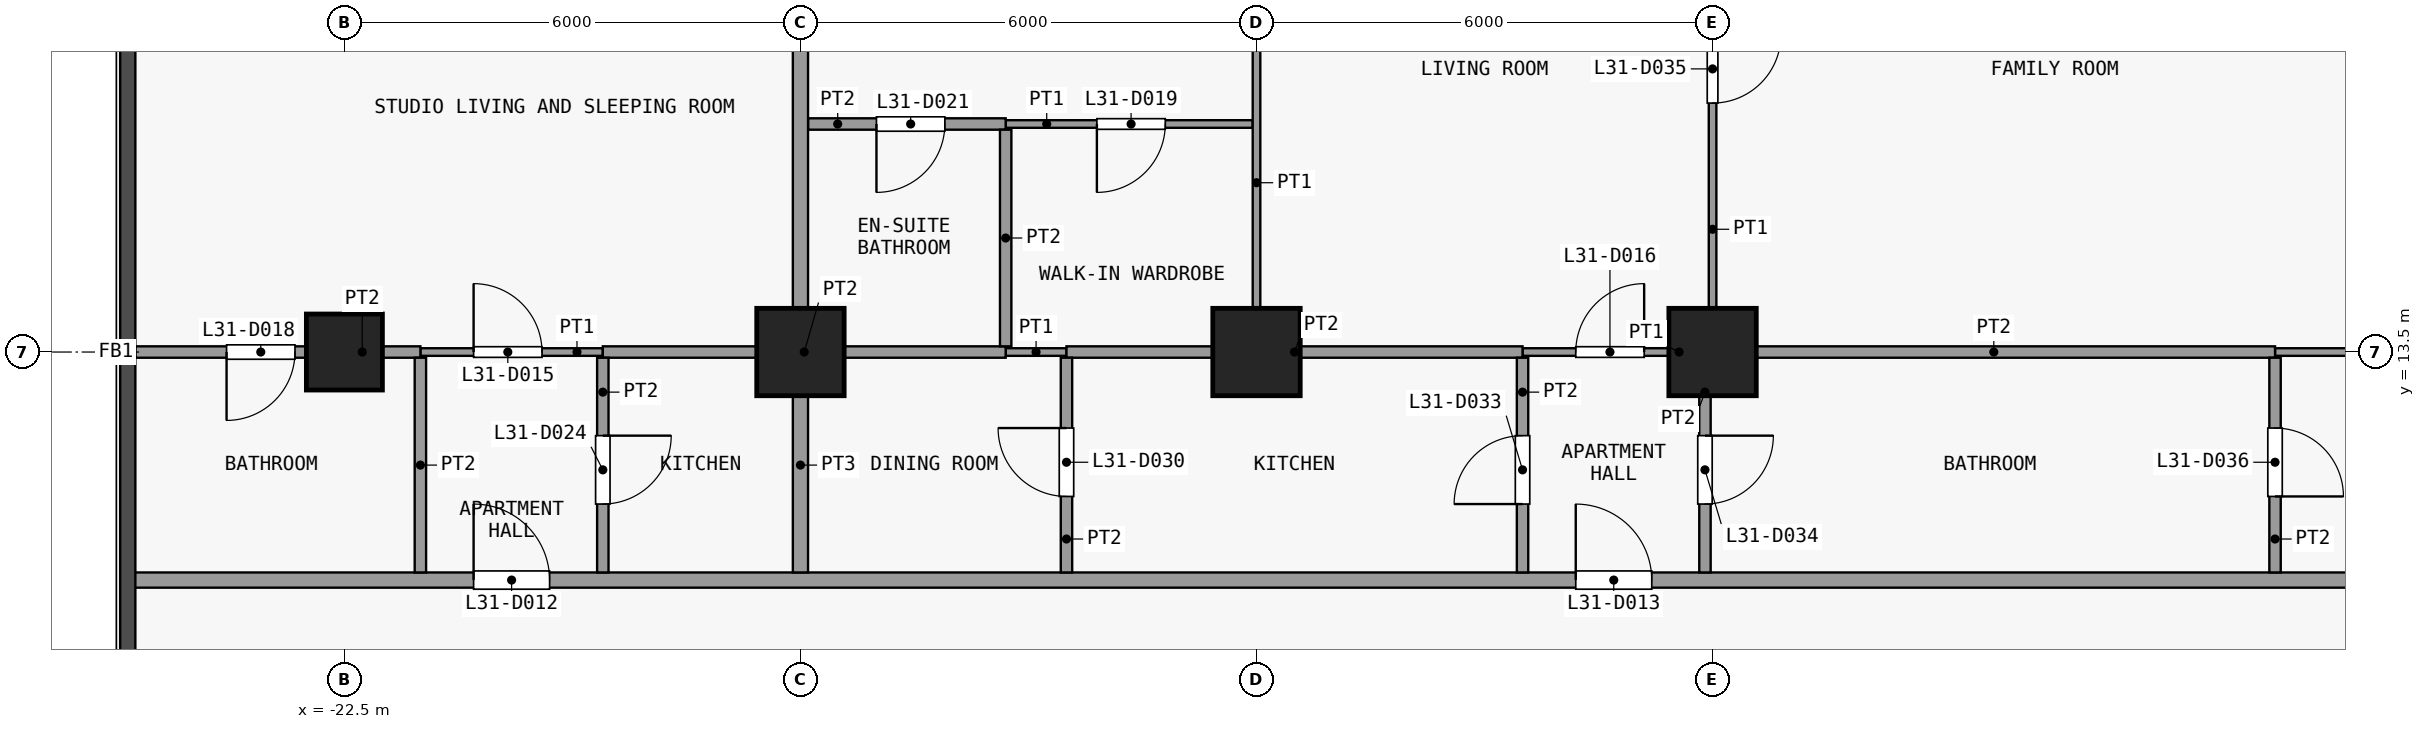
"""IFC4 building model, lengths in metres.
Left out: names, types, materials, properties, quantities, classifications, styles, units other than length and angle.
Written with IfcOpenShell. Run it as: python <this file> out.ifc"""

import sys

from ifc_helpers import new_model, si_unit, direction, frame, frame_2d, origin, origin_2d, place, context, subcontext, project, spatial, rectangle, extrude, element, fill, save


model = new_model("IFC4")
c1 = context("Model", 3, precision=1e-05, world=origin(), true_north=direction((0.0, 1.0)))
c2 = subcontext(c1, "Body", "Model", "MODEL_VIEW")
j1 = project(units=[si_unit("LENGTHUNIT", "METRE"), si_unit("PLANEANGLEUNIT", "RADIAN")], contexts=[c1])
p1 = place(None, origin())
s1 = spatial("IfcSite", under=j1, at=p1, CompositionType="ELEMENT")
p2 = place(p1, origin())
s2 = spatial("IfcBuilding", under=s1, at=p2, CompositionType="ELEMENT")
p3 = place(p2, frame((0.0, 0.0, 124.3)))
s3 = spatial("IfcBuildingStorey", under=s2, at=p3, CompositionType="ELEMENT", Elevation=124.3)
p4 = place(p3, frame((-22.5, 13.5, 0.0), z_axis=(0.0, 0.0, 1.0), x_axis=(1.0, 0.0, 0.0)))
e1 = element("IfcColumn", 1, at=p4, inside=s3, PredefinedType="COLUMN", context=c2, shape_type="SweptSolid", body=[
    extrude(rectangle(XDim=1.0, YDim=1.0, at=origin_2d()), origin(), (0.0, 0.0, 1.0), 3.6),
])
for number, where, z_axis, x_axis in (
    (2, (-16.5, 13.5, 0.0), (0.0, 0.0, 1.0), (1.0, 0.0, 0.0)),
    (3, (-10.5, 13.5, 0.0), (0.0, 0.0, 1.0), (1.0, 0.0, 0.0)),
    (4, (-4.5, 13.5, 0.0), (0.0, 0.0, 1.0), (1.0, 0.0, 0.0)),
):
    element("IfcColumn", number, at=place(p3, frame(where, z_axis=z_axis, x_axis=x_axis)), inside=s3, PredefinedType="COLUMN", context=c2, shape_type="SweptSolid", body=[
        extrude(rectangle(XDim=1.15, YDim=1.15, at=origin_2d()), origin(), (0.0, 0.0, 1.0), 3.6),
    ])
p5 = place(p3, frame((-25.35, 10.5, 0.0), z_axis=(0.0, 0.0, 1.0), x_axis=(1.0, 0.0, 0.0)))
e5 = element("IfcWall", 5, at=p5, inside=s3, PredefinedType="PARTITIONING", context=c2, shape_type="SweptSolid", body=[
    extrude(rectangle(XDim=49.2, YDim=0.2, at=frame_2d((24.6, 0.0))), origin(), (0.0, 0.0, 1.0), 3.3),
])
p6 = place(p5, frame((4.55, 0.0, 0.0)))
e6 = element("IfcOpeningElement", 6, at=p6, cuts=e5, PredefinedType="OPENING", context=c2, shape_type="SweptSolid", body=[
    extrude(rectangle(XDim=1.0, YDim=2.1, at=frame_2d((0.5, 1.05))), frame((0.0, 0.11, 0.0), z_axis=(0.0, -1.0, 0.0), x_axis=(1.0, 0.0, 0.0)), (0.0, 0.0, 1.0), 0.22),
])
p7 = place(p5, frame((19.05, 0.0, 0.0)))
e7 = element("IfcOpeningElement", 7, at=p7, cuts=e5, PredefinedType="OPENING", context=c2, shape_type="SweptSolid", body=[
    extrude(rectangle(XDim=1.0, YDim=2.1, at=frame_2d((0.5, 1.05))), frame((0.0, 0.11, 0.0), z_axis=(0.0, -1.0, 0.0), x_axis=(1.0, 0.0, 0.0)), (0.0, 0.0, 1.0), 0.22),
])
p8 = place(p5, frame((39.05, 0.0, 0.0)))
e8 = element("IfcOpeningElement", 8, at=p8, cuts=e5, PredefinedType="OPENING", context=c2, shape_type="SweptSolid", body=[
    extrude(rectangle(XDim=1.0, YDim=2.1, at=frame_2d((0.5, 1.05))), frame((0.0, 0.11, 0.0), z_axis=(0.0, -1.0, 0.0), x_axis=(1.0, 0.0, 0.0)), (0.0, 0.0, 1.0), 0.22),
])
p9 = place(p3, frame((-21.5, 13.5, 0.0), z_axis=(0.0, 0.0, 1.0), x_axis=(1.0, 0.0, 0.0)))
e9 = element("IfcWall", 9, at=p9, inside=s3, PredefinedType="PARTITIONING", context=c2, shape_type="SweptSolid", body=[
    extrude(rectangle(XDim=2.4, YDim=0.1, at=frame_2d((1.2, 0.0))), origin(), (0.0, 0.0, 1.0), 3.3),
])
p10 = place(p9, frame((0.7, 0.0, 0.0)))
e10 = element("IfcOpeningElement", 10, at=p10, cuts=e9, PredefinedType="OPENING", context=c2, shape_type="SweptSolid", body=[
    extrude(rectangle(XDim=0.9, YDim=2.1, at=frame_2d((0.45, 1.05))), frame((0.0, 0.06, 0.0), z_axis=(0.0, -1.0, 0.0), x_axis=(1.0, 0.0, 0.0)), (0.0, 0.0, 1.0), 0.12),
])
p11 = place(p3, frame((-13.8, 13.5, 0.0), z_axis=(0.0, 0.0, 1.0), x_axis=(1.0, 0.0, 0.0)))
e11 = element("IfcWall", 11, at=p11, inside=s3, PredefinedType="PARTITIONING", context=c2, shape_type="SweptSolid", body=[
    extrude(rectangle(XDim=0.8, YDim=0.1, at=frame_2d((0.4, 0.0))), origin(), (0.0, 0.0, 1.0), 3.3),
])
p12 = place(p3, frame((-7.0, 13.5, 0.0), z_axis=(0.0, 0.0, 1.0), x_axis=(1.0, 0.0, 0.0)))
e12 = element("IfcWall", 12, at=p12, inside=s3, PredefinedType="PARTITIONING", context=c2, shape_type="SweptSolid", body=[
    extrude(rectangle(XDim=2.4, YDim=0.1, at=frame_2d((1.2, 0.0))), origin(), (0.0, 0.0, 1.0), 3.3),
])
p13 = place(p12, frame((0.7, 0.0, 0.0)))
e13 = element("IfcOpeningElement", 13, at=p13, cuts=e12, PredefinedType="OPENING", context=c2, shape_type="SweptSolid", body=[
    extrude(rectangle(XDim=0.9, YDim=2.1, at=frame_2d((0.45, 1.05))), frame((0.0, 0.06, 0.0), z_axis=(0.0, -1.0, 0.0), x_axis=(1.0, 0.0, 0.0)), (0.0, 0.0, 1.0), 0.12),
])
p14 = place(p3, frame((2.9, 13.5, 0.0), z_axis=(0.0, 0.0, 1.0), x_axis=(1.0, 0.0, 0.0)))
e14 = element("IfcWall", 14, at=p14, inside=s3, PredefinedType="PARTITIONING", context=c2, shape_type="SweptSolid", body=[
    extrude(rectangle(XDim=7.6, YDim=0.1, at=frame_2d((3.8, 0.0))), origin(), (0.0, 0.0, 1.0), 3.3),
])
p15 = place(p3, frame((-25.25, 13.5, 0.0), z_axis=(0.0, 0.0, 1.0), x_axis=(1.0, 0.0, 0.0)))
e15 = element("IfcWall", 15, at=p15, inside=s3, PredefinedType="PARTITIONING", context=c2, shape_type="SweptSolid", body=[
    extrude(rectangle(XDim=3.75, YDim=0.15, at=frame_2d((1.875, 0.0))), origin(), (0.0, 0.0, 1.0), 3.3),
])
p16 = place(p15, frame((1.2, 0.0, 0.0)))
e16 = element("IfcOpeningElement", 16, at=p16, cuts=e15, PredefinedType="OPENING", context=c2, shape_type="SweptSolid", body=[
    extrude(rectangle(XDim=0.9, YDim=2.1, at=frame_2d((0.45, 1.05))), frame((0.0, 0.085, 0.0), z_axis=(0.0, -1.0, 0.0), x_axis=(1.0, 0.0, 0.0)), (0.0, 0.0, 1.0), 0.17),
])
p17 = place(p3, frame((-19.1, 13.5, 0.0), z_axis=(0.0, 0.0, 1.0), x_axis=(1.0, 0.0, 0.0)))
e17 = element("IfcWall", 17, at=p17, inside=s3, PredefinedType="PARTITIONING", context=c2, shape_type="SweptSolid", body=[
    extrude(rectangle(XDim=5.3, YDim=0.15, at=frame_2d((2.65, 0.0))), origin(), (0.0, 0.0, 1.0), 3.3),
])
p18 = place(p3, frame((-13.0, 13.5, 0.0), z_axis=(0.0, 0.0, 1.0), x_axis=(1.0, 0.0, 0.0)))
e18 = element("IfcWall", 18, at=p18, inside=s3, PredefinedType="PARTITIONING", context=c2, shape_type="SweptSolid", body=[
    extrude(rectangle(XDim=6.0, YDim=0.15, at=frame_2d((3.0, 0.0))), origin(), (0.0, 0.0, 1.0), 3.3),
])
p19 = place(p3, frame((-4.5, 13.5, 0.0), z_axis=(0.0, 0.0, 1.0), x_axis=(1.0, 0.0, 0.0)))
e19 = element("IfcWall", 19, at=p19, inside=s3, PredefinedType="PARTITIONING", context=c2, shape_type="SweptSolid", body=[
    extrude(rectangle(XDim=7.4, YDim=0.15, at=frame_2d((3.7, 0.0))), origin(), (0.0, 0.0, 1.0), 3.3),
])
p20 = place(p3, frame((-13.8, 16.5, 0.0), z_axis=(0.0, 0.0, 1.0), x_axis=(1.0, 0.0, 0.0)))
e20 = element("IfcWall", 20, at=p20, inside=s3, PredefinedType="PARTITIONING", context=c2, shape_type="SweptSolid", body=[
    extrude(rectangle(XDim=3.25, YDim=0.1, at=frame_2d((1.625, 0.0))), origin(), (0.0, 0.0, 1.0), 3.3),
])
p21 = place(p20, frame((1.2, 0.0, 0.0)))
e21 = element("IfcOpeningElement", 21, at=p21, cuts=e20, PredefinedType="OPENING", context=c2, shape_type="SweptSolid", body=[
    extrude(rectangle(XDim=0.9, YDim=2.1, at=frame_2d((0.45, 1.05))), frame((0.0, 0.06, 0.0), z_axis=(0.0, -1.0, 0.0), x_axis=(1.0, 0.0, 0.0)), (0.0, 0.0, 1.0), 0.12),
])
p22 = place(p3, frame((-16.4, 16.5, 0.0), z_axis=(0.0, 0.0, 1.0), x_axis=(1.0, 0.0, 0.0)))
e22 = element("IfcWall", 22, at=p22, inside=s3, PredefinedType="PARTITIONING", context=c2, shape_type="SweptSolid", body=[
    extrude(rectangle(XDim=2.6, YDim=0.15, at=frame_2d((1.3, 0.0))), origin(), (0.0, 0.0, 1.0), 3.3),
])
p23 = place(p22, frame((0.9, 0.0, 0.0)))
e23 = element("IfcOpeningElement", 23, at=p23, cuts=e22, PredefinedType="OPENING", context=c2, shape_type="SweptSolid", body=[
    extrude(rectangle(XDim=0.9, YDim=2.1, at=frame_2d((0.45, 1.05))), frame((0.0, 0.085, 0.0), z_axis=(0.0, -1.0, 0.0), x_axis=(1.0, 0.0, 0.0)), (0.0, 0.0, 1.0), 0.17),
])
p24 = place(p3, frame((-21.5, 10.6, 0.0), z_axis=(0.0, 0.0, 1.0), x_axis=(0.0, 1.0, 0.0)))
e24 = element("IfcWall", 24, at=p24, inside=s3, PredefinedType="PARTITIONING", context=c2, shape_type="SweptSolid", body=[
    extrude(rectangle(XDim=2.825, YDim=0.15, at=frame_2d((1.413, 0.0))), origin(), (0.0, 0.0, 1.0), 3.3),
])
p25 = place(p3, frame((-19.1, 10.6, 0.0), z_axis=(0.0, 0.0, 1.0), x_axis=(0.0, 1.0, 0.0)))
e25 = element("IfcWall", 25, at=p25, inside=s3, PredefinedType="PARTITIONING", context=c2, shape_type="SweptSolid", body=[
    extrude(rectangle(XDim=2.825, YDim=0.15, at=frame_2d((1.413, 0.0))), origin(), (0.0, 0.0, 1.0), 3.3),
])
p26 = place(p25, frame((0.9, 0.0, 0.0)))
e26 = element("IfcOpeningElement", 26, at=p26, cuts=e25, PredefinedType="OPENING", context=c2, shape_type="SweptSolid", body=[
    extrude(rectangle(XDim=0.9, YDim=2.1, at=frame_2d((0.45, 1.05))), frame((0.0, 0.085, 0.0), z_axis=(0.0, -1.0, 0.0), x_axis=(1.0, 0.0, 0.0)), (0.0, 0.0, 1.0), 0.17),
])
p27 = place(p3, frame((-16.5, 10.6, 0.0), z_axis=(0.0, 0.0, 1.0), x_axis=(0.0, 1.0, 0.0)))
e27 = element("IfcWall", 27, at=p27, inside=s3, PredefinedType="PARTITIONING", context=c2, shape_type="SweptSolid", body=[
    extrude(rectangle(XDim=2.825, YDim=0.2, at=frame_2d((1.413, 0.0))), origin(), (0.0, 0.0, 1.0), 3.3),
])
p28 = place(p3, frame((-16.5, 13.575, 0.0), z_axis=(0.0, 0.0, 1.0), x_axis=(0.0, 1.0, 0.0)))
e28 = element("IfcWall", 28, at=p28, inside=s3, PredefinedType="PARTITIONING", context=c2, shape_type="SweptSolid", body=[
    extrude(rectangle(XDim=8.675, YDim=0.2, at=frame_2d((4.337, 0.0))), origin(), (0.0, 0.0, 1.0), 3.3),
])
p29 = place(p3, frame((-13.8, 13.575, 0.0), z_axis=(0.0, 0.0, 1.0), x_axis=(0.0, 1.0, 0.0)))
e29 = element("IfcWall", 29, at=p29, inside=s3, PredefinedType="PARTITIONING", context=c2, shape_type="SweptSolid", body=[
    extrude(rectangle(XDim=2.85, YDim=0.15, at=frame_2d((1.425, 0.0))), origin(), (0.0, 0.0, 1.0), 3.3),
])
p30 = place(p3, frame((-13.0, 10.6, 0.0), z_axis=(0.0, 0.0, 1.0), x_axis=(0.0, 1.0, 0.0)))
e30 = element("IfcWall", 30, at=p30, inside=s3, PredefinedType="PARTITIONING", context=c2, shape_type="SweptSolid", body=[
    extrude(rectangle(XDim=2.825, YDim=0.15, at=frame_2d((1.413, 0.0))), origin(), (0.0, 0.0, 1.0), 3.3),
])
p31 = place(p30, frame((1.0, 0.0, 0.0)))
e31 = element("IfcOpeningElement", 31, at=p31, cuts=e30, PredefinedType="OPENING", context=c2, shape_type="SweptSolid", body=[
    extrude(rectangle(XDim=0.9, YDim=2.1, at=frame_2d((0.45, 1.05))), frame((0.0, 0.085, 0.0), z_axis=(0.0, -1.0, 0.0), x_axis=(1.0, 0.0, 0.0)), (0.0, 0.0, 1.0), 0.17),
])
p32 = place(p3, frame((-10.5, 13.575, 0.0), z_axis=(0.0, 0.0, 1.0), x_axis=(0.0, 1.0, 0.0)))
e32 = element("IfcWall", 32, at=p32, inside=s3, PredefinedType="PARTITIONING", context=c2, shape_type="SweptSolid", body=[
    extrude(rectangle(XDim=8.675, YDim=0.1, at=frame_2d((4.337, 0.0))), origin(), (0.0, 0.0, 1.0), 3.3),
])
p33 = place(p32, frame((4.425, 0.0, 0.0)))
e33 = element("IfcOpeningElement", 33, at=p33, cuts=e32, PredefinedType="OPENING", context=c2, shape_type="SweptSolid", body=[
    extrude(rectangle(XDim=0.9, YDim=2.1, at=frame_2d((0.45, 1.05))), frame((0.0, 0.06, 0.0), z_axis=(0.0, -1.0, 0.0), x_axis=(1.0, 0.0, 0.0)), (0.0, 0.0, 1.0), 0.12),
])
p34 = place(p3, frame((-7.0, 10.6, 0.0), z_axis=(0.0, 0.0, 1.0), x_axis=(0.0, 1.0, 0.0)))
e34 = element("IfcWall", 34, at=p34, inside=s3, PredefinedType="PARTITIONING", context=c2, shape_type="SweptSolid", body=[
    extrude(rectangle(XDim=2.825, YDim=0.15, at=frame_2d((1.413, 0.0))), origin(), (0.0, 0.0, 1.0), 3.3),
])
p35 = place(p34, frame((0.9, 0.0, 0.0)))
e35 = element("IfcOpeningElement", 35, at=p35, cuts=e34, PredefinedType="OPENING", context=c2, shape_type="SweptSolid", body=[
    extrude(rectangle(XDim=0.9, YDim=2.1, at=frame_2d((0.45, 1.05))), frame((0.0, 0.085, 0.0), z_axis=(0.0, -1.0, 0.0), x_axis=(1.0, 0.0, 0.0)), (0.0, 0.0, 1.0), 0.17),
])
p36 = place(p3, frame((-4.6, 10.6, 0.0), z_axis=(0.0, 0.0, 1.0), x_axis=(0.0, 1.0, 0.0)))
e36 = element("IfcWall", 36, at=p36, inside=s3, PredefinedType="PARTITIONING", context=c2, shape_type="SweptSolid", body=[
    extrude(rectangle(XDim=2.825, YDim=0.15, at=frame_2d((1.413, 0.0))), origin(), (0.0, 0.0, 1.0), 3.3),
])
p37 = place(p36, frame((0.9, 0.0, 0.0)))
e37 = element("IfcOpeningElement", 37, at=p37, cuts=e36, PredefinedType="OPENING", context=c2, shape_type="SweptSolid", body=[
    extrude(rectangle(XDim=0.9, YDim=2.1, at=frame_2d((0.45, 1.05))), frame((0.0, 0.085, 0.0), z_axis=(0.0, -1.0, 0.0), x_axis=(1.0, 0.0, 0.0)), (0.0, 0.0, 1.0), 0.17),
])
p38 = place(p3, frame((-4.5, 13.575, 0.0), z_axis=(0.0, 0.0, 1.0), x_axis=(0.0, 1.0, 0.0)))
e38 = element("IfcWall", 38, at=p38, inside=s3, PredefinedType="PARTITIONING", context=c2, shape_type="SweptSolid", body=[
    extrude(rectangle(XDim=7.275, YDim=0.1, at=frame_2d((3.638, 0.0))), origin(), (0.0, 0.0, 1.0), 3.3),
])
p39 = place(p38, frame((3.2, 0.0, 0.0)))
e39 = element("IfcOpeningElement", 39, at=p39, cuts=e38, PredefinedType="OPENING", context=c2, shape_type="SweptSolid", body=[
    extrude(rectangle(XDim=0.9, YDim=2.1, at=frame_2d((0.45, 1.05))), frame((0.0, 0.06, 0.0), z_axis=(0.0, -1.0, 0.0), x_axis=(1.0, 0.0, 0.0)), (0.0, 0.0, 1.0), 0.12),
])
p40 = place(p3, frame((2.9, 10.6, 0.0), z_axis=(0.0, 0.0, 1.0), x_axis=(0.0, 1.0, 0.0)))
e40 = element("IfcWall", 40, at=p40, inside=s3, PredefinedType="PARTITIONING", context=c2, shape_type="SweptSolid", body=[
    extrude(rectangle(XDim=2.825, YDim=0.15, at=frame_2d((1.413, 0.0))), origin(), (0.0, 0.0, 1.0), 3.3),
])
p41 = place(p40, frame((1.0, 0.0, 0.0)))
e41 = element("IfcOpeningElement", 41, at=p41, cuts=e40, PredefinedType="OPENING", context=c2, shape_type="SweptSolid", body=[
    extrude(rectangle(XDim=0.9, YDim=2.1, at=frame_2d((0.45, 1.05))), frame((0.0, 0.085, 0.0), z_axis=(0.0, -1.0, 0.0), x_axis=(1.0, 0.0, 0.0)), (0.0, 0.0, 1.0), 0.17),
])
p42 = place(p6, origin())
e42 = element("IfcDoor", 42, at=p42, inside=s3, OperationType="SINGLE_SWING_RIGHT", PredefinedType="DOOR", context=c2, shape_type="SweptSolid", body=[
    extrude(rectangle(XDim=1.0, YDim=2.1, at=frame_2d((0.5, 1.05))), frame((0.0, 0.025, 0.0), z_axis=(0.0, -1.0, 0.0), x_axis=(1.0, 0.0, 0.0)), (0.0, 0.0, 1.0), 0.05),
])
fill(e6, e42)
p43 = place(p7, origin())
e43 = element("IfcDoor", 43, at=p43, inside=s3, OperationType="SINGLE_SWING_RIGHT", PredefinedType="DOOR", context=c2, shape_type="SweptSolid", body=[
    extrude(rectangle(XDim=1.0, YDim=2.1, at=frame_2d((0.5, 1.05))), frame((0.0, 0.025, 0.0), z_axis=(0.0, -1.0, 0.0), x_axis=(1.0, 0.0, 0.0)), (0.0, 0.0, 1.0), 0.05),
])
fill(e7, e43)
p44 = place(p10, origin())
e44 = element("IfcDoor", 44, at=p44, inside=s3, OperationType="SINGLE_SWING_RIGHT", PredefinedType="DOOR", context=c2, shape_type="SweptSolid", body=[
    extrude(rectangle(XDim=0.9, YDim=2.1, at=frame_2d((0.45, 1.05))), frame((0.0, 0.025, 0.0), z_axis=(0.0, -1.0, 0.0), x_axis=(1.0, 0.0, 0.0)), (0.0, 0.0, 1.0), 0.05),
])
fill(e10, e44)
p45 = place(p13, origin())
e45 = element("IfcDoor", 45, at=p45, inside=s3, OperationType="SINGLE_SWING_LEFT", PredefinedType="DOOR", context=c2, shape_type="SweptSolid", body=[
    extrude(rectangle(XDim=0.9, YDim=2.1, at=frame_2d((0.45, 1.05))), frame((0.0, 0.025, 0.0), z_axis=(0.0, -1.0, 0.0), x_axis=(1.0, 0.0, 0.0)), (0.0, 0.0, 1.0), 0.05),
])
fill(e13, e45)
p46 = place(p16, origin())
e46 = element("IfcDoor", 46, at=p46, inside=s3, OperationType="SINGLE_SWING_LEFT", PredefinedType="DOOR", context=c2, shape_type="SweptSolid", body=[
    extrude(rectangle(XDim=0.9, YDim=2.1, at=frame_2d((0.45, 1.05))), frame((0.0, 0.025, 0.0), z_axis=(0.0, -1.0, 0.0), x_axis=(1.0, 0.0, 0.0)), (0.0, 0.0, 1.0), 0.05),
])
fill(e16, e46)
p47 = place(p21, origin())
e47 = element("IfcDoor", 47, at=p47, inside=s3, OperationType="SINGLE_SWING_LEFT", PredefinedType="DOOR", context=c2, shape_type="SweptSolid", body=[
    extrude(rectangle(XDim=0.9, YDim=2.1, at=frame_2d((0.45, 1.05))), frame((0.0, 0.025, 0.0), z_axis=(0.0, -1.0, 0.0), x_axis=(1.0, 0.0, 0.0)), (0.0, 0.0, 1.0), 0.05),
])
fill(e21, e47)
p48 = place(p23, origin())
e48 = element("IfcDoor", 48, at=p48, inside=s3, OperationType="SINGLE_SWING_LEFT", PredefinedType="DOOR", context=c2, shape_type="SweptSolid", body=[
    extrude(rectangle(XDim=0.9, YDim=2.1, at=frame_2d((0.45, 1.05))), frame((0.0, 0.025, 0.0), z_axis=(0.0, -1.0, 0.0), x_axis=(1.0, 0.0, 0.0)), (0.0, 0.0, 1.0), 0.05),
])
fill(e23, e48)
p49 = place(p26, origin())
e49 = element("IfcDoor", 49, at=p49, inside=s3, OperationType="SINGLE_SWING_RIGHT", PredefinedType="DOOR", context=c2, shape_type="SweptSolid", body=[
    extrude(rectangle(XDim=0.9, YDim=2.1, at=frame_2d((0.45, 1.05))), frame((0.0, 0.025, 0.0), z_axis=(0.0, -1.0, 0.0), x_axis=(1.0, 0.0, 0.0)), (0.0, 0.0, 1.0), 0.05),
])
fill(e26, e49)
p50 = place(p31, origin())
e50 = element("IfcDoor", 50, at=p50, inside=s3, OperationType="SINGLE_SWING_LEFT", PredefinedType="DOOR", context=c2, shape_type="SweptSolid", body=[
    extrude(rectangle(XDim=0.9, YDim=2.1, at=frame_2d((0.45, 1.05))), frame((0.0, 0.025, 0.0), z_axis=(0.0, -1.0, 0.0), x_axis=(1.0, 0.0, 0.0)), (0.0, 0.0, 1.0), 0.05),
])
fill(e31, e50)
p51 = place(p35, origin())
e51 = element("IfcDoor", 51, at=p51, inside=s3, OperationType="SINGLE_SWING_RIGHT", PredefinedType="DOOR", context=c2, shape_type="SweptSolid", body=[
    extrude(rectangle(XDim=0.9, YDim=2.1, at=frame_2d((0.45, 1.05))), frame((0.0, 0.025, 0.0), z_axis=(0.0, -1.0, 0.0), x_axis=(1.0, 0.0, 0.0)), (0.0, 0.0, 1.0), 0.05),
])
fill(e35, e51)
p52 = place(p37, origin())
e52 = element("IfcDoor", 52, at=p52, inside=s3, OperationType="SINGLE_SWING_RIGHT", PredefinedType="DOOR", context=c2, shape_type="SweptSolid", body=[
    extrude(rectangle(XDim=0.9, YDim=2.1, at=frame_2d((0.45, 1.05))), frame((0.0, 0.025, 0.0), z_axis=(0.0, -1.0, 0.0), x_axis=(1.0, 0.0, 0.0)), (0.0, 0.0, 1.0), 0.05),
])
fill(e37, e52)
p53 = place(p39, origin())
e53 = element("IfcDoor", 53, at=p53, inside=s3, OperationType="SINGLE_SWING_RIGHT", PredefinedType="DOOR", context=c2, shape_type="SweptSolid", body=[
    extrude(rectangle(XDim=0.9, YDim=2.1, at=frame_2d((0.45, 1.05))), frame((0.0, 0.025, 0.0), z_axis=(0.0, -1.0, 0.0), x_axis=(1.0, 0.0, 0.0)), (0.0, 0.0, 1.0), 0.05),
])
fill(e39, e53)
p54 = place(p41, origin())
e54 = element("IfcDoor", 54, at=p54, inside=s3, OperationType="SINGLE_SWING_LEFT", PredefinedType="DOOR", context=c2, shape_type="SweptSolid", body=[
    extrude(rectangle(XDim=0.9, YDim=2.1, at=frame_2d((0.45, 1.05))), frame((0.0, 0.025, 0.0), z_axis=(0.0, -1.0, 0.0), x_axis=(1.0, 0.0, 0.0)), (0.0, 0.0, 1.0), 0.05),
])
fill(e41, e54)
save(model, sys.argv[1])
